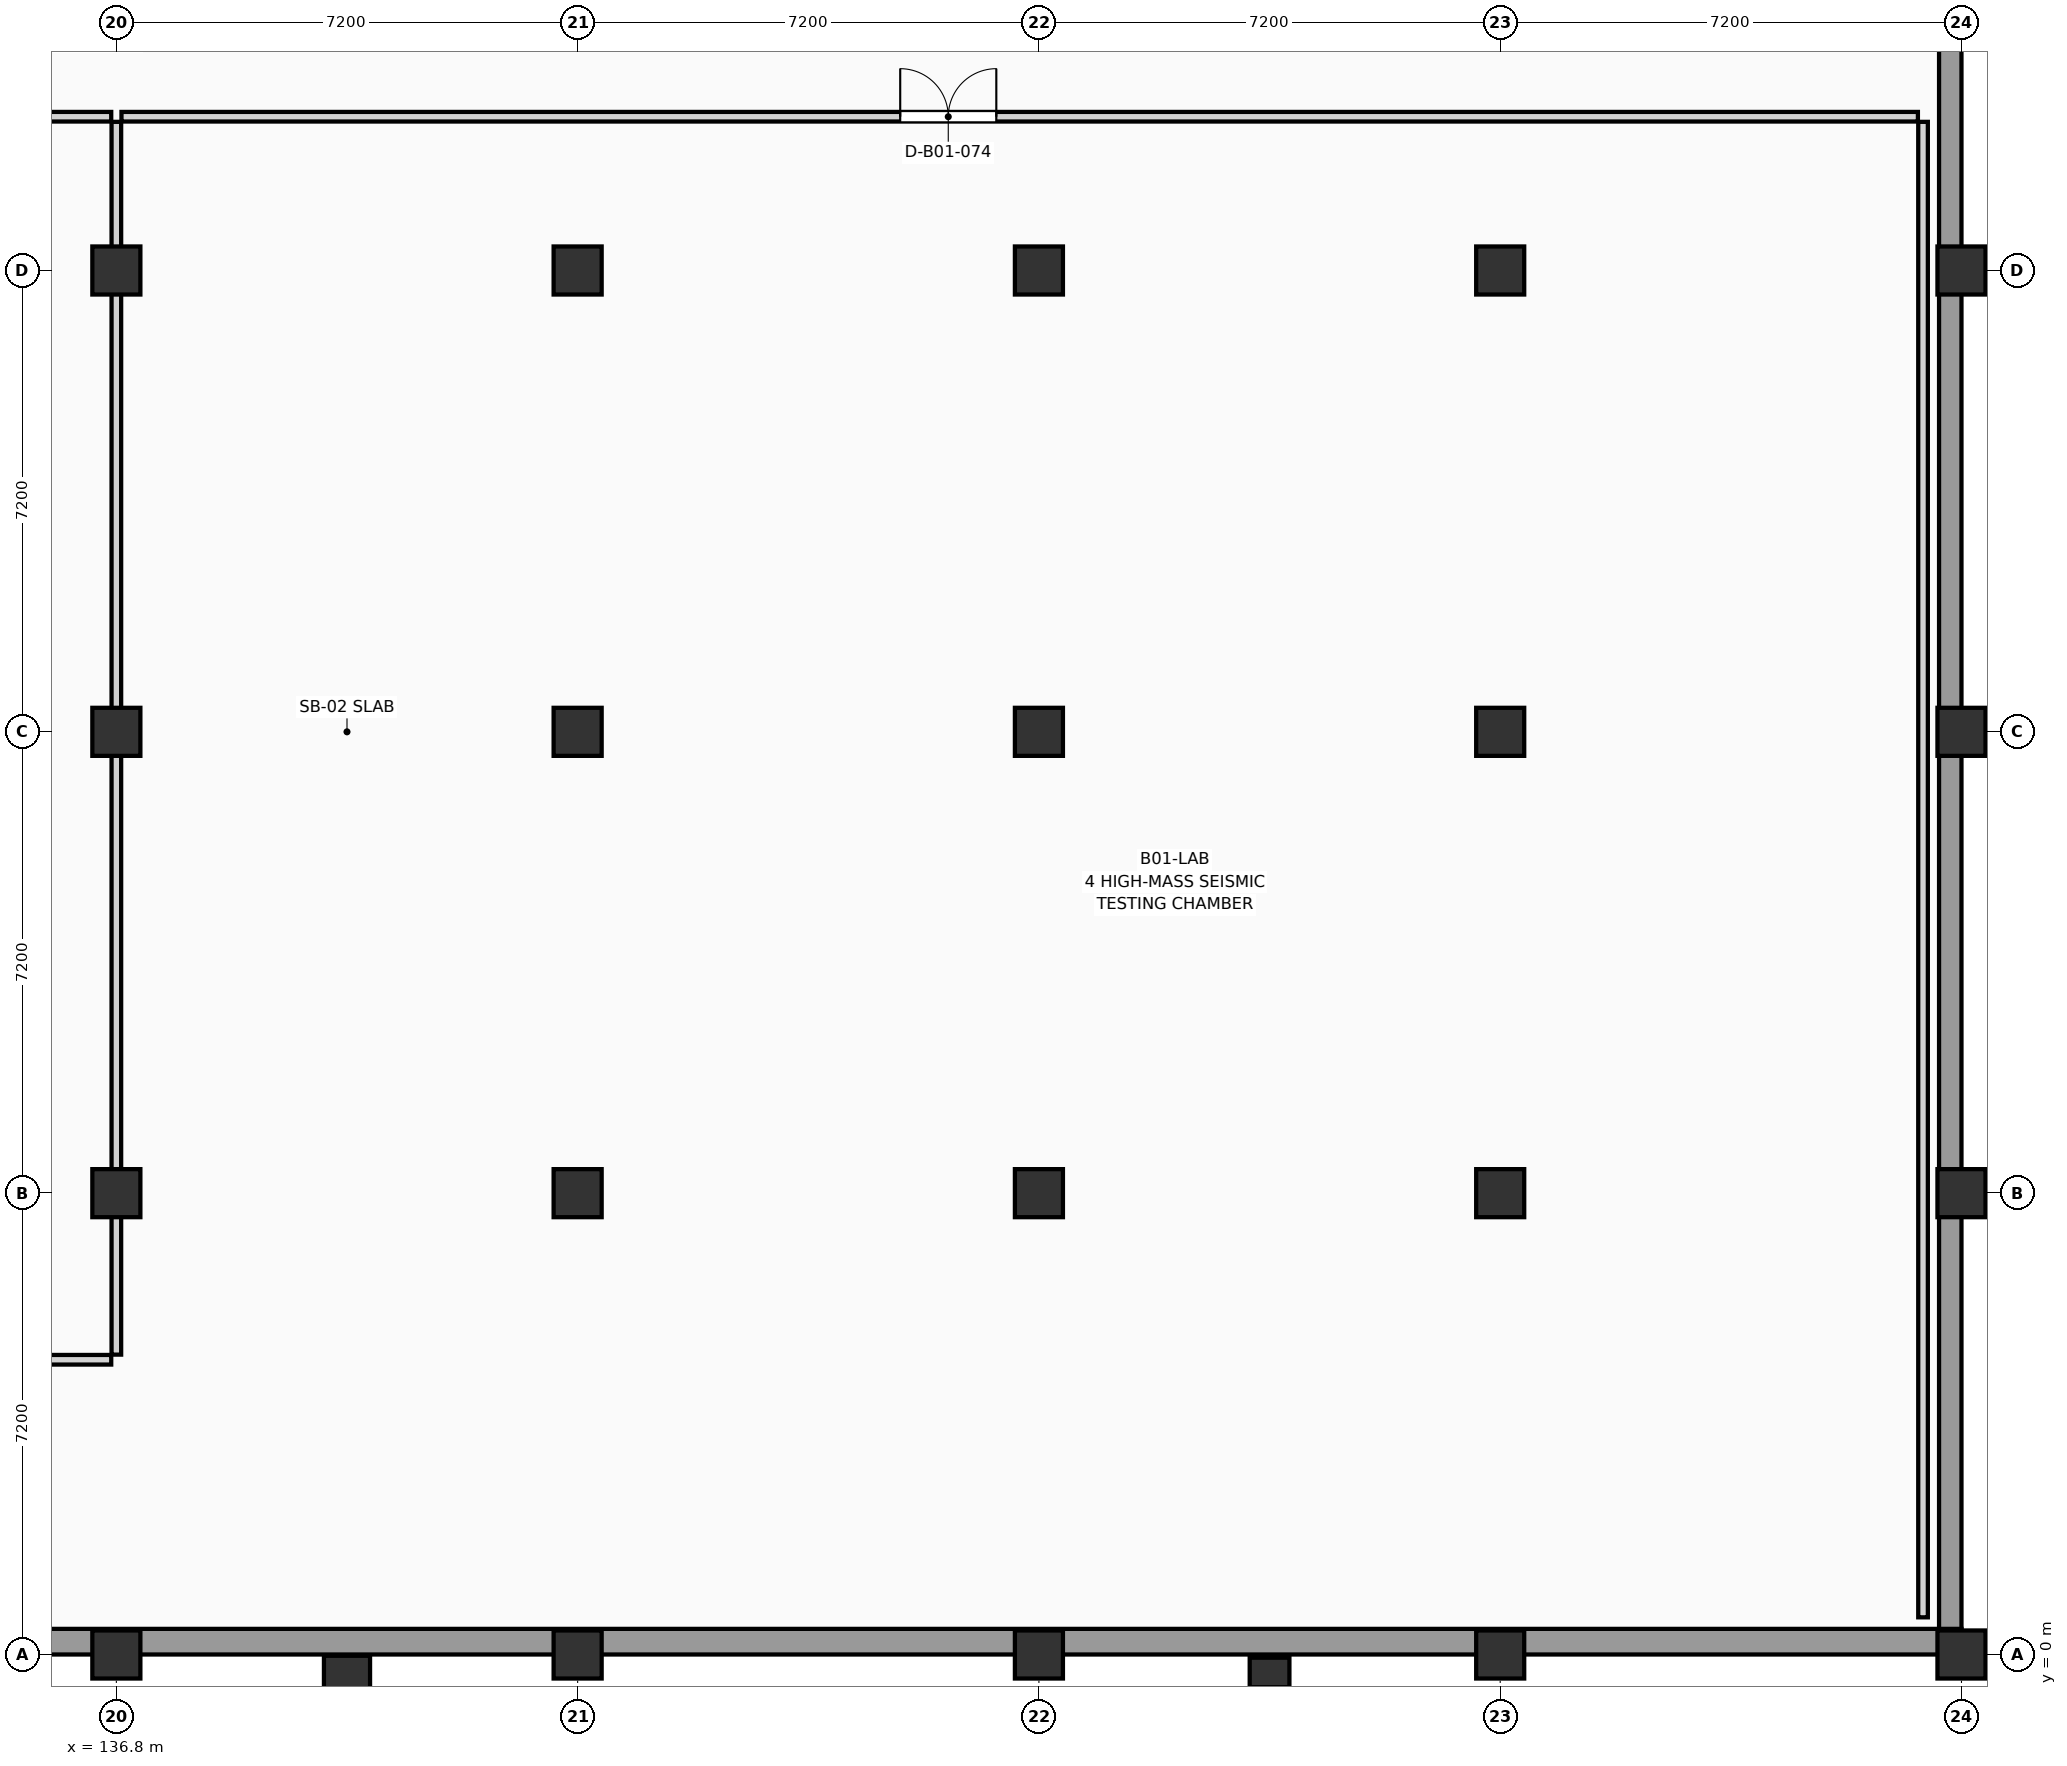
"""IFC4 building model, lengths in metres.
Left out: names, types, materials, properties, quantities, classifications, styles, units other than length and angle.
Written with IfcOpenShell. Run it as: python <this file> out.ifc"""

import sys

from ifc_helpers import new_model, si_unit, direction, frame, frame_2d, origin, origin_2d, place, context, subcontext, project, spatial, rectangle, extrude, element, fill, save


model = new_model("IFC4")
c1 = context("Model", 3, precision=1e-05, world=origin(), true_north=direction((0.0, 1.0)))
c2 = subcontext(c1, "Body", "Model", "MODEL_VIEW")
j1 = project(units=[si_unit("LENGTHUNIT", "METRE"), si_unit("PLANEANGLEUNIT", "RADIAN")], contexts=[c1])
p1 = place(None, origin())
s1 = spatial("IfcSite", under=j1, at=p1, CompositionType="ELEMENT")
p2 = place(p1, origin())
s2 = spatial("IfcBuilding", under=s1, at=p2, CompositionType="ELEMENT")
p3 = place(p2, frame((0.0, 0.0, -4.5)))
s3 = spatial("IfcBuildingStorey", under=s2, at=p3, CompositionType="ELEMENT", Elevation=-4.5)
for number, where, z_axis, x_axis in (
    (1, (136.8, 0.0, -0.28), (0.0, 0.0, 1.0), (1.0, 0.0, 0.0)),
    (2, (136.8, 7.2, -0.28), (0.0, 0.0, 1.0), (1.0, 0.0, 0.0)),
    (3, (136.8, 14.4, -0.28), (0.0, 0.0, 1.0), (1.0, 0.0, 0.0)),
    (4, (136.8, 21.6, -0.28), (0.0, 0.0, 1.0), (1.0, 0.0, 0.0)),
    (5, (144.0, 0.0, -0.28), (0.0, 0.0, 1.0), (1.0, 0.0, 0.0)),
    (6, (144.0, 7.2, -0.28), (0.0, 0.0, 1.0), (1.0, 0.0, 0.0)),
    (7, (144.0, 14.4, -0.28), (0.0, 0.0, 1.0), (1.0, 0.0, 0.0)),
    (8, (144.0, 21.6, -0.28), (0.0, 0.0, 1.0), (1.0, 0.0, 0.0)),
    (9, (151.2, 0.0, -0.28), (0.0, 0.0, 1.0), (1.0, 0.0, 0.0)),
    (10, (151.2, 7.2, -0.28), (0.0, 0.0, 1.0), (1.0, 0.0, 0.0)),
    (11, (151.2, 14.4, -0.28), (0.0, 0.0, 1.0), (1.0, 0.0, 0.0)),
    (12, (151.2, 21.6, -0.28), (0.0, 0.0, 1.0), (1.0, 0.0, 0.0)),
    (13, (158.4, 0.0, -0.28), (0.0, 0.0, 1.0), (1.0, 0.0, 0.0)),
    (14, (158.4, 7.2, -0.28), (0.0, 0.0, 1.0), (1.0, 0.0, 0.0)),
    (15, (158.4, 14.4, -0.28), (0.0, 0.0, 1.0), (1.0, 0.0, 0.0)),
    (16, (158.4, 21.6, -0.28), (0.0, 0.0, 1.0), (1.0, 0.0, 0.0)),
    (17, (165.6, 0.0, -0.28), (0.0, 0.0, 1.0), (1.0, 0.0, 0.0)),
    (18, (165.6, 7.2, -0.28), (0.0, 0.0, 1.0), (1.0, 0.0, 0.0)),
    (19, (165.6, 14.4, -0.28), (0.0, 0.0, 1.0), (1.0, 0.0, 0.0)),
    (20, (165.6, 21.6, -0.28), (0.0, 0.0, 1.0), (1.0, 0.0, 0.0)),
):
    element("IfcColumn", number, at=place(p3, frame(where, z_axis=z_axis, x_axis=x_axis)), inside=s3, PredefinedType="COLUMN", context=c2, shape_type="SweptSolid", body=[
        extrude(rectangle(XDim=0.75, YDim=0.75, at=origin_2d()), origin(), (0.0, 0.0, 1.0), 4.78),
    ])
p4 = place(p3, frame((140.4, -0.28, -0.28), z_axis=(0.0, 0.0, 1.0), x_axis=(0.0, 1.0, 0.0)))
e21 = element("IfcColumn", 21, at=p4, inside=s3, PredefinedType="PILASTER", context=c2, shape_type="SweptSolid", body=[
    extrude(rectangle(XDim=0.52, YDim=0.72, at=origin_2d()), origin(), (0.0, 0.0, 1.0), 4.78),
])
p5 = place(p3, frame((154.8, -0.28, -0.28), z_axis=(0.0, 0.0, 1.0), x_axis=(0.0, 1.0, 0.0)))
e22 = element("IfcColumn", 22, at=p5, inside=s3, PredefinedType="PILASTER", context=c2, shape_type="SweptSolid", body=[
    extrude(rectangle(XDim=0.46, YDim=0.62, at=origin_2d()), origin(), (0.0, 0.0, 1.0), 4.78),
])
p6 = place(p3, frame((165.425, 28.8, -0.3), z_axis=(0.0, 0.0, 1.0), x_axis=(0.0, -1.0, 0.0)))
e23 = element("IfcWall", 23, at=p6, inside=s3, PredefinedType="USERDEFINED", context=c2, shape_type="SweptSolid", body=[
    extrude(rectangle(XDim=28.8, YDim=0.35, at=frame_2d((14.4, 0.0))), origin(), (0.0, 0.0, 1.0), 4.54),
])
p7 = place(p3, frame((165.6, 0.2, -0.3), z_axis=(0.0, 0.0, 1.0), x_axis=(-1.0, 0.0, 0.0)))
e24 = element("IfcWall", 24, at=p7, inside=s3, PredefinedType="USERDEFINED", context=c2, shape_type="SweptSolid", body=[
    extrude(rectangle(XDim=50.4, YDim=0.4, at=frame_2d((25.2, 0.0))), origin(), (0.0, 0.0, 1.0), 4.54),
])
p8 = place(p3, frame((107.38, 4.6, 0.0), z_axis=(0.0, 0.0, 1.0), x_axis=(1.0, 0.0, 0.0)))
e25 = element("IfcWall", 25, at=p8, inside=s3, PredefinedType="PARTITIONING", context=c2, shape_type="SweptSolid", body=[
    extrude(rectangle(XDim=29.34, YDim=0.15, at=frame_2d((14.67, 0.0))), origin(), (0.0, 0.0, 1.0), 4.225),
])
p9 = place(p8, frame((3.066, 0.0, 0.0)))
e26 = element("IfcOpeningElement", 26, at=p9, cuts=e25, PredefinedType="OPENING", context=c2, shape_type="SweptSolid", body=[
    extrude(rectangle(XDim=1.5, YDim=2.2, at=frame_2d((0.75, 1.1))), frame((0.0, 0.087, 0.0), z_axis=(0.0, -1.0, 0.0), x_axis=(1.0, 0.0, 0.0)), (0.0, 0.0, 1.0), 0.174),
])
p10 = place(p3, frame((136.8, 4.68, 0.0), z_axis=(0.0, 0.0, 1.0), x_axis=(0.0, 1.0, 0.0)))
e27 = element("IfcWall", 27, at=p10, inside=s3, PredefinedType="PARTITIONING", context=c2, shape_type="SweptSolid", body=[
    extrude(rectangle(XDim=19.24, YDim=0.15, at=frame_2d((9.62, 0.0))), origin(), (0.0, 0.0, 1.0), 3.375),
])
p11 = place(p3, frame((107.38, 24.0, 0.0), z_axis=(0.0, 0.0, 1.0), x_axis=(1.0, 0.0, 0.0)))
e28 = element("IfcWall", 28, at=p11, inside=s3, PredefinedType="PARTITIONING", context=c2, shape_type="SweptSolid", body=[
    extrude(rectangle(XDim=29.34, YDim=0.15, at=frame_2d((14.67, 0.0))), origin(), (0.0, 0.0, 1.0), 4.225),
])
p12 = place(p3, frame((165.0, 0.58, 0.0), z_axis=(0.0, 0.0, 1.0), x_axis=(0.0, 1.0, 0.0)))
e29 = element("IfcWall", 29, at=p12, inside=s3, PredefinedType="PARTITIONING", context=c2, shape_type="SweptSolid", body=[
    extrude(rectangle(XDim=23.34, YDim=0.15, at=frame_2d((11.67, 0.0))), origin(), (0.0, 0.0, 1.0), 4.225),
])
p13 = place(p3, frame((136.88, 24.0, 0.0), z_axis=(0.0, 0.0, 1.0), x_axis=(1.0, 0.0, 0.0)))
e30 = element("IfcWall", 30, at=p13, inside=s3, PredefinedType="PARTITIONING", context=c2, shape_type="SweptSolid", body=[
    extrude(rectangle(XDim=28.04, YDim=0.15, at=frame_2d((14.02, 0.0))), origin(), (0.0, 0.0, 1.0), 4.225),
])
p14 = place(p13, frame((12.155, 0.0, 0.0)))
e31 = element("IfcOpeningElement", 31, at=p14, cuts=e30, PredefinedType="OPENING", context=c2, shape_type="SweptSolid", body=[
    extrude(rectangle(XDim=1.5, YDim=2.2, at=frame_2d((0.75, 1.1))), frame((0.0, 0.087, 0.0), z_axis=(0.0, -1.0, 0.0), x_axis=(1.0, 0.0, 0.0)), (0.0, 0.0, 1.0), 0.174),
])
p15 = place(p14, origin())
e32 = element("IfcDoor", 32, at=p15, inside=s3, OperationType="DOUBLE_DOOR_SINGLE_SWING", PredefinedType="DOOR", context=c2, shape_type="SweptSolid", body=[
    extrude(rectangle(XDim=1.5, YDim=2.2, at=frame_2d((0.75, 1.1))), frame((0.0, 0.025, 0.0), z_axis=(0.0, -1.0, 0.0), x_axis=(1.0, 0.0, 0.0)), (0.0, 0.0, 1.0), 0.05),
])
fill(e31, e32)
save(model, sys.argv[1])
